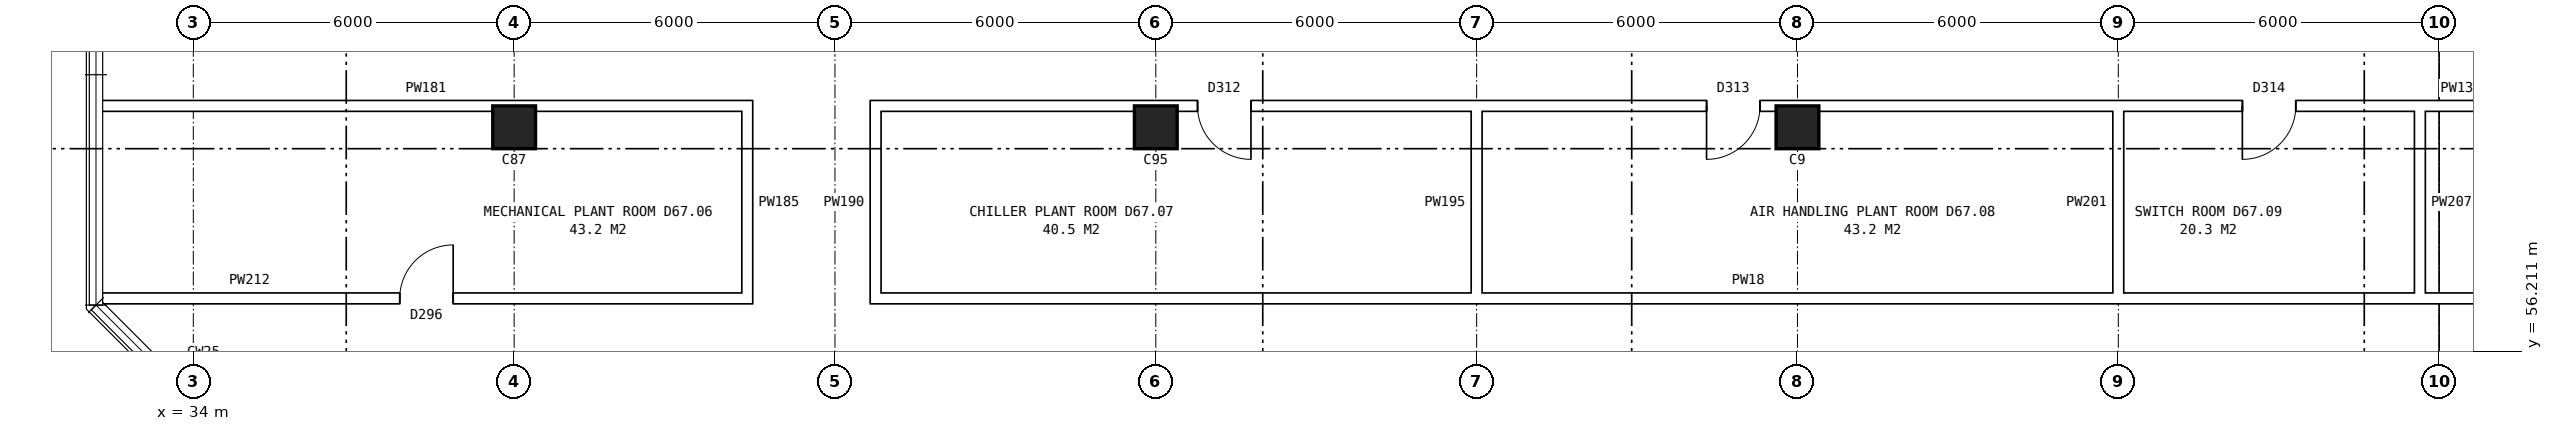
"""IFC4 building model, lengths in metres.
Left out: names, types, materials, properties, quantities, classifications, styles, units other than length and angle.
Written with IfcOpenShell. Run it as: python <this file> out.ifc"""

import sys

from ifc_helpers import new_model, si_unit, direction, frame, frame_2d, origin, origin_2d, place, context, subcontext, project, spatial, rectangle, extrude, element, fill, save


model = new_model("IFC4")
c1 = context("Model", 3, precision=1e-05, world=origin(), true_north=direction((0.0, 1.0)))
c2 = subcontext(c1, "Body", "Model", "MODEL_VIEW")
j1 = project(units=[si_unit("LENGTHUNIT", "METRE"), si_unit("PLANEANGLEUNIT", "RADIAN")], contexts=[c1])
p1 = place(None, origin())
s1 = spatial("IfcSite", under=j1, at=p1, CompositionType="ELEMENT")
p2 = place(p1, origin())
s2 = spatial("IfcBuilding", under=s1, at=p2, CompositionType="ELEMENT")
p3 = place(p2, frame((0.0, 0.0, 236.9)))
s3 = spatial("IfcBuildingStorey", under=s2, at=p3, CompositionType="ELEMENT", Elevation=236.9)
for number, where, z_axis, x_axis in (
    (1, (40.0, 60.4, 0.0), (0.0, 0.0, 1.0), (1.0, 0.0, 0.0)),
    (2, (52.0, 60.4, 0.0), (0.0, 0.0, 1.0), (1.0, 0.0, 0.0)),
    (3, (64.0, 60.4, 0.0), (0.0, 0.0, 1.0), (1.0, 0.0, 0.0)),
):
    element("IfcColumn", number, at=place(p3, frame(where, z_axis=z_axis, x_axis=x_axis)), inside=s3, PredefinedType="COLUMN", context=c2, shape_type="SweptSolid", body=[
        extrude(rectangle(XDim=0.8, YDim=0.8, at=origin_2d()), origin(), (0.0, 0.0, 1.0), 6.7),
    ])
p4 = place(p3, frame((32.24, 57.2, 0.0), z_axis=(0.0, 0.0, 1.0), x_axis=(1.0, 0.0, 0.0)))
e4 = element("IfcWall", 4, at=p4, inside=s3, PredefinedType="PARTITIONING", context=c2, shape_type="SweptSolid", body=[
    extrude(rectangle(XDim=12.22, YDim=0.2, at=frame_2d((6.11, 0.0))), origin(), (0.0, 0.0, 1.0), 6.7),
])
p5 = place(p4, frame((5.62, 0.0, 0.0)))
e5 = element("IfcOpeningElement", 5, at=p5, cuts=e4, PredefinedType="OPENING", context=c2, shape_type="SweptSolid", body=[
    extrude(rectangle(XDim=1.0, YDim=2.1, at=frame_2d((0.5, 1.05))), frame((0.0, 0.11, 0.0), z_axis=(0.0, -1.0, 0.0), x_axis=(1.0, 0.0, 0.0)), (0.0, 0.0, 1.0), 0.22),
])
p6 = place(p3, frame((46.66, 57.2, 0.0), z_axis=(0.0, 0.0, 1.0), x_axis=(1.0, 0.0, 0.0)))
e6 = element("IfcWall", 6, at=p6, inside=s3, PredefinedType="PARTITIONING", context=c2, shape_type="SweptSolid", body=[
    extrude(rectangle(XDim=122.1, YDim=0.2, at=frame_2d((61.05, 0.0))), origin(), (0.0, 0.0, 1.0), 6.7),
])
p7 = place(p3, frame((32.24, 60.8, 0.0), z_axis=(0.0, 0.0, 1.0), x_axis=(1.0, 0.0, 0.0)))
e7 = element("IfcWall", 7, at=p7, inside=s3, PredefinedType="PARTITIONING", context=c2, shape_type="SweptSolid", body=[
    extrude(rectangle(XDim=12.22, YDim=0.2, at=frame_2d((6.11, 0.0))), origin(), (0.0, 0.0, 1.0), 6.7),
])
p8 = place(p3, frame((46.66, 60.8, 0.0), z_axis=(0.0, 0.0, 1.0), x_axis=(1.0, 0.0, 0.0)))
e8 = element("IfcWall", 8, at=p8, inside=s3, PredefinedType="PARTITIONING", context=c2, shape_type="SweptSolid", body=[
    extrude(rectangle(XDim=122.1, YDim=0.2, at=frame_2d((61.05, 0.0))), origin(), (0.0, 0.0, 1.0), 6.7),
])
p9 = place(p8, frame((6.12, 0.0, 0.0)))
e9 = element("IfcOpeningElement", 9, at=p9, cuts=e8, PredefinedType="OPENING", context=c2, shape_type="SweptSolid", body=[
    extrude(rectangle(XDim=1.0, YDim=2.1, at=frame_2d((0.5, 1.05))), frame((0.0, 0.11, 0.0), z_axis=(0.0, -1.0, 0.0), x_axis=(1.0, 0.0, 0.0)), (0.0, 0.0, 1.0), 0.22),
])
p10 = place(p8, frame((15.64, 0.0, 0.0)))
e10 = element("IfcOpeningElement", 10, at=p10, cuts=e8, PredefinedType="OPENING", context=c2, shape_type="SweptSolid", body=[
    extrude(rectangle(XDim=1.0, YDim=2.1, at=frame_2d((0.5, 1.05))), frame((0.0, 0.11, 0.0), z_axis=(0.0, -1.0, 0.0), x_axis=(1.0, 0.0, 0.0)), (0.0, 0.0, 1.0), 0.22),
])
p11 = place(p8, frame((25.66, 0.0, 0.0)))
e11 = element("IfcOpeningElement", 11, at=p11, cuts=e8, PredefinedType="OPENING", context=c2, shape_type="SweptSolid", body=[
    extrude(rectangle(XDim=1.0, YDim=2.1, at=frame_2d((0.5, 1.05))), frame((0.0, 0.11, 0.0), z_axis=(0.0, -1.0, 0.0), x_axis=(1.0, 0.0, 0.0)), (0.0, 0.0, 1.0), 0.22),
])
p12 = place(p8, frame((35.535, 0.0, 0.0)))
e12 = element("IfcOpeningElement", 12, at=p12, cuts=e8, PredefinedType="OPENING", context=c2, shape_type="SweptSolid", body=[
    extrude(rectangle(XDim=1.0, YDim=2.1, at=frame_2d((0.5, 1.05))), frame((0.0, 0.11, 0.0), z_axis=(0.0, -1.0, 0.0), x_axis=(1.0, 0.0, 0.0)), (0.0, 0.0, 1.0), 0.22),
])
p13 = place(p8, frame((52.902, 0.0, 0.0)))
e13 = element("IfcOpeningElement", 13, at=p13, cuts=e8, PredefinedType="OPENING", context=c2, shape_type="SweptSolid", body=[
    extrude(rectangle(XDim=1.0, YDim=2.1, at=frame_2d((0.5, 1.05))), frame((0.0, 0.11, 0.0), z_axis=(0.0, -1.0, 0.0), x_axis=(1.0, 0.0, 0.0)), (0.0, 0.0, 1.0), 0.22),
])
p14 = place(p8, frame((73.708, 0.0, 0.0)))
e14 = element("IfcOpeningElement", 14, at=p14, cuts=e8, PredefinedType="OPENING", context=c2, shape_type="SweptSolid", body=[
    extrude(rectangle(XDim=1.0, YDim=2.1, at=frame_2d((0.5, 1.05))), frame((0.0, 0.11, 0.0), z_axis=(0.0, -1.0, 0.0), x_axis=(1.0, 0.0, 0.0)), (0.0, 0.0, 1.0), 0.22),
])
p15 = place(p8, frame((90.02, 0.0, 0.0)))
e15 = element("IfcOpeningElement", 15, at=p15, cuts=e8, PredefinedType="OPENING", context=c2, shape_type="SweptSolid", body=[
    extrude(rectangle(XDim=1.0, YDim=2.1, at=frame_2d((0.5, 1.05))), frame((0.0, 0.11, 0.0), z_axis=(0.0, -1.0, 0.0), x_axis=(1.0, 0.0, 0.0)), (0.0, 0.0, 1.0), 0.22),
])
p16 = place(p8, frame((101.84, 0.0, 0.0)))
e16 = element("IfcOpeningElement", 16, at=p16, cuts=e8, PredefinedType="OPENING", context=c2, shape_type="SweptSolid", body=[
    extrude(rectangle(XDim=1.0, YDim=2.1, at=frame_2d((0.5, 1.05))), frame((0.0, 0.11, 0.0), z_axis=(0.0, -1.0, 0.0), x_axis=(1.0, 0.0, 0.0)), (0.0, 0.0, 1.0), 0.22),
])
p17 = place(p8, frame((114.66, 0.0, 0.0)))
e17 = element("IfcOpeningElement", 17, at=p17, cuts=e8, PredefinedType="OPENING", context=c2, shape_type="SweptSolid", body=[
    extrude(rectangle(XDim=1.0, YDim=2.1, at=frame_2d((0.5, 1.05))), frame((0.0, 0.11, 0.0), z_axis=(0.0, -1.0, 0.0), x_axis=(1.0, 0.0, 0.0)), (0.0, 0.0, 1.0), 0.22),
])
for number, where, z_axis, x_axis in (
    (18, (44.36, 57.1, 0.0), (0.0, 0.0, 1.0), (0.0, 1.0, 0.0)),
    (19, (46.76, 57.1, 0.0), (0.0, 0.0, 1.0), (0.0, 1.0, 0.0)),
    (20, (58.0, 57.1, 0.0), (0.0, 0.0, 1.0), (0.0, 1.0, 0.0)),
    (21, (70.0, 57.1, 0.0), (0.0, 0.0, 1.0), (0.0, 1.0, 0.0)),
    (22, (75.64, 57.1, 0.0), (0.0, 0.0, 1.0), (0.0, 1.0, 0.0)),
):
    element("IfcWall", number, at=place(p3, frame(where, z_axis=z_axis, x_axis=x_axis)), inside=s3, PredefinedType="PARTITIONING", context=c2, shape_type="SweptSolid", body=[
        extrude(rectangle(XDim=3.8, YDim=0.2, at=frame_2d((1.9, 0.0))), origin(), (0.0, 0.0, 1.0), 6.7),
    ])
p18 = place(p5, origin())
e23 = element("IfcDoor", 23, at=p18, inside=s3, OperationType="SINGLE_SWING_RIGHT", PredefinedType="DOOR", context=c2, shape_type="SweptSolid", body=[
    extrude(rectangle(XDim=1.0, YDim=2.1, at=frame_2d((0.5, 1.05))), frame((0.0, 0.025, 0.0), z_axis=(0.0, -1.0, 0.0), x_axis=(1.0, 0.0, 0.0)), (0.0, 0.0, 1.0), 0.05),
])
fill(e5, e23)
p19 = place(p9, frame((1.0, 0.0, 0.0), z_axis=(0.0, 0.0, 1.0), x_axis=(-1.0, 0.0, 0.0)))
e24 = element("IfcDoor", 24, at=p19, inside=s3, OperationType="SINGLE_SWING_LEFT", PredefinedType="DOOR", context=c2, shape_type="SweptSolid", body=[
    extrude(rectangle(XDim=1.0, YDim=2.1, at=frame_2d((0.5, 1.05))), frame((0.0, 0.025, 0.0), z_axis=(0.0, -1.0, 0.0), x_axis=(1.0, 0.0, 0.0)), (0.0, 0.0, 1.0), 0.05),
])
fill(e9, e24)
p20 = place(p10, frame((1.0, 0.0, 0.0), z_axis=(0.0, 0.0, 1.0), x_axis=(-1.0, 0.0, 0.0)))
e25 = element("IfcDoor", 25, at=p20, inside=s3, OperationType="SINGLE_SWING_RIGHT", PredefinedType="DOOR", context=c2, shape_type="SweptSolid", body=[
    extrude(rectangle(XDim=1.0, YDim=2.1, at=frame_2d((0.5, 1.05))), frame((0.0, 0.025, 0.0), z_axis=(0.0, -1.0, 0.0), x_axis=(1.0, 0.0, 0.0)), (0.0, 0.0, 1.0), 0.05),
])
fill(e10, e25)
p21 = place(p11, frame((1.0, 0.0, 0.0), z_axis=(0.0, 0.0, 1.0), x_axis=(-1.0, 0.0, 0.0)))
e26 = element("IfcDoor", 26, at=p21, inside=s3, OperationType="SINGLE_SWING_RIGHT", PredefinedType="DOOR", context=c2, shape_type="SweptSolid", body=[
    extrude(rectangle(XDim=1.0, YDim=2.1, at=frame_2d((0.5, 1.05))), frame((0.0, 0.025, 0.0), z_axis=(0.0, -1.0, 0.0), x_axis=(1.0, 0.0, 0.0)), (0.0, 0.0, 1.0), 0.05),
])
fill(e11, e26)
save(model, sys.argv[1])
